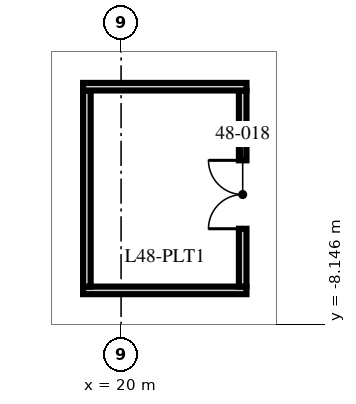
"""IFC4 building model, lengths in metres.
Left out: names, types, materials, properties, quantities, classifications, styles, units other than length and angle.
Written with IfcOpenShell. Run it as: python <this file> out.ifc"""

import sys

from ifc_helpers import new_model, si_unit, direction, frame, frame_2d, origin, origin_2d, place, context, subcontext, project, spatial, rectangle, hollow_rectangle, extrude, element, fill, save


model = new_model("IFC4")
c1 = context("Model", 3, precision=1e-05, world=origin(), true_north=direction((0.0, 1.0)))
c2 = subcontext(c1, "Body", "Model", "MODEL_VIEW")
j1 = project(units=[si_unit("LENGTHUNIT", "METRE"), si_unit("PLANEANGLEUNIT", "RADIAN")], contexts=[c1])
p1 = place(None, origin())
s1 = spatial("IfcSite", under=j1, at=p1, CompositionType="ELEMENT")
p2 = place(p1, origin())
s2 = spatial("IfcBuilding", under=s1, at=p2, CompositionType="ELEMENT")
p3 = place(p2, frame((0.0, 0.0, 192.0)))
s3 = spatial("IfcBuildingStorey", under=s2, at=p3, CompositionType="ELEMENT", Elevation=192.0)
p4 = place(p3, frame((27.1, 0.0, -0.65), z_axis=(-0.334792284074, 0.0, 0.942291953974), x_axis=(0.0, 1.0, 0.0)))
e1 = element("IfcColumn", 1, at=p4, inside=s3, PredefinedType="COLUMN", context=c2, shape_type="SweptSolid", body=[
    extrude(hollow_rectangle(XDim=3.2, YDim=1.8, WallThickness=0.2, at=origin_2d()), origin(), (0.0, 0.0, 1.0), 8.065),
])
p5 = place(p3, frame((27.1, -9.16, -0.65), z_axis=(-0.332991803119, 0.103570687408, 0.937224397765), x_axis=(0.034607128924, 0.994622092871, -0.097617821118)))
e2 = element("IfcColumn", 2, at=p5, inside=s3, PredefinedType="COLUMN", context=c2, shape_type="SweptSolid", body=[
    extrude(hollow_rectangle(XDim=3.2, YDim=1.8, WallThickness=0.2, at=origin_2d()), origin(), (0.0, 0.0, 1.0), 8.109),
])
p6 = place(p3, frame((19.0, -7.26, 0.0), z_axis=(0.0, 0.0, 1.0), x_axis=(1.0, 0.0, 0.0)))
e3 = element("IfcWall", 3, at=p6, inside=s3, PredefinedType="SOLIDWALL", context=c2, shape_type="SweptSolid", body=[
    extrude(rectangle(XDim=4.3, YDim=0.2, at=frame_2d((2.15, 0.0))), origin(), (0.0, 0.0, 1.0), 7.25),
])
p7 = place(p3, frame((19.1, -7.16, 0.0), z_axis=(0.0, 0.0, 1.0), x_axis=(0.0, 1.0, 0.0)))
e4 = element("IfcWall", 4, at=p7, inside=s3, PredefinedType="SOLIDWALL", context=c2, shape_type="SweptSolid", body=[
    extrude(rectangle(XDim=5.16, YDim=0.2, at=frame_2d((2.58, 0.0))), origin(), (0.0, 0.0, 1.0), 6.56),
])
p8 = place(p3, frame((23.2, -7.16, 0.0), z_axis=(0.0, 0.0, 1.0), x_axis=(0.0, 1.0, 0.0)))
e5 = element("IfcWall", 5, at=p8, inside=s3, PredefinedType="SOLIDWALL", context=c2, shape_type="SweptSolid", body=[
    extrude(rectangle(XDim=5.16, YDim=0.2, at=frame_2d((2.58, 0.0))), origin(), (0.0, 0.0, 1.0), 6.56),
])
p9 = place(p8, frame((1.522, 0.0, 0.0)))
e6 = element("IfcOpeningElement", 6, at=p9, cuts=e5, PredefinedType="OPENING", context=c2, shape_type="SweptSolid", body=[
    extrude(rectangle(XDim=1.8, YDim=2.4, at=frame_2d((0.9, 1.2))), frame((0.0, 0.11, 0.0), z_axis=(0.0, -1.0, 0.0), x_axis=(1.0, 0.0, 0.0)), (0.0, 0.0, 1.0), 0.22),
])
p10 = place(p3, frame((19.0, -1.9, 0.0), z_axis=(0.0, 0.0, 1.0), x_axis=(1.0, 0.0, 0.0)))
e7 = element("IfcWall", 7, at=p10, inside=s3, PredefinedType="SOLIDWALL", context=c2, shape_type="SweptSolid", body=[
    extrude(rectangle(XDim=4.3, YDim=0.2, at=frame_2d((2.15, 0.0))), origin(), (0.0, 0.0, 1.0), 7.25),
])
p11 = place(p9, origin())
e8 = element("IfcDoor", 8, at=p11, inside=s3, OperationType="DOUBLE_DOOR_SINGLE_SWING", PredefinedType="DOOR", context=c2, shape_type="SweptSolid", body=[
    extrude(rectangle(XDim=1.8, YDim=2.4, at=frame_2d((0.9, 1.2))), frame((0.0, 0.025, 0.0), z_axis=(0.0, -1.0, 0.0), x_axis=(1.0, 0.0, 0.0)), (0.0, 0.0, 1.0), 0.05),
])
fill(e6, e8)
save(model, sys.argv[1])
